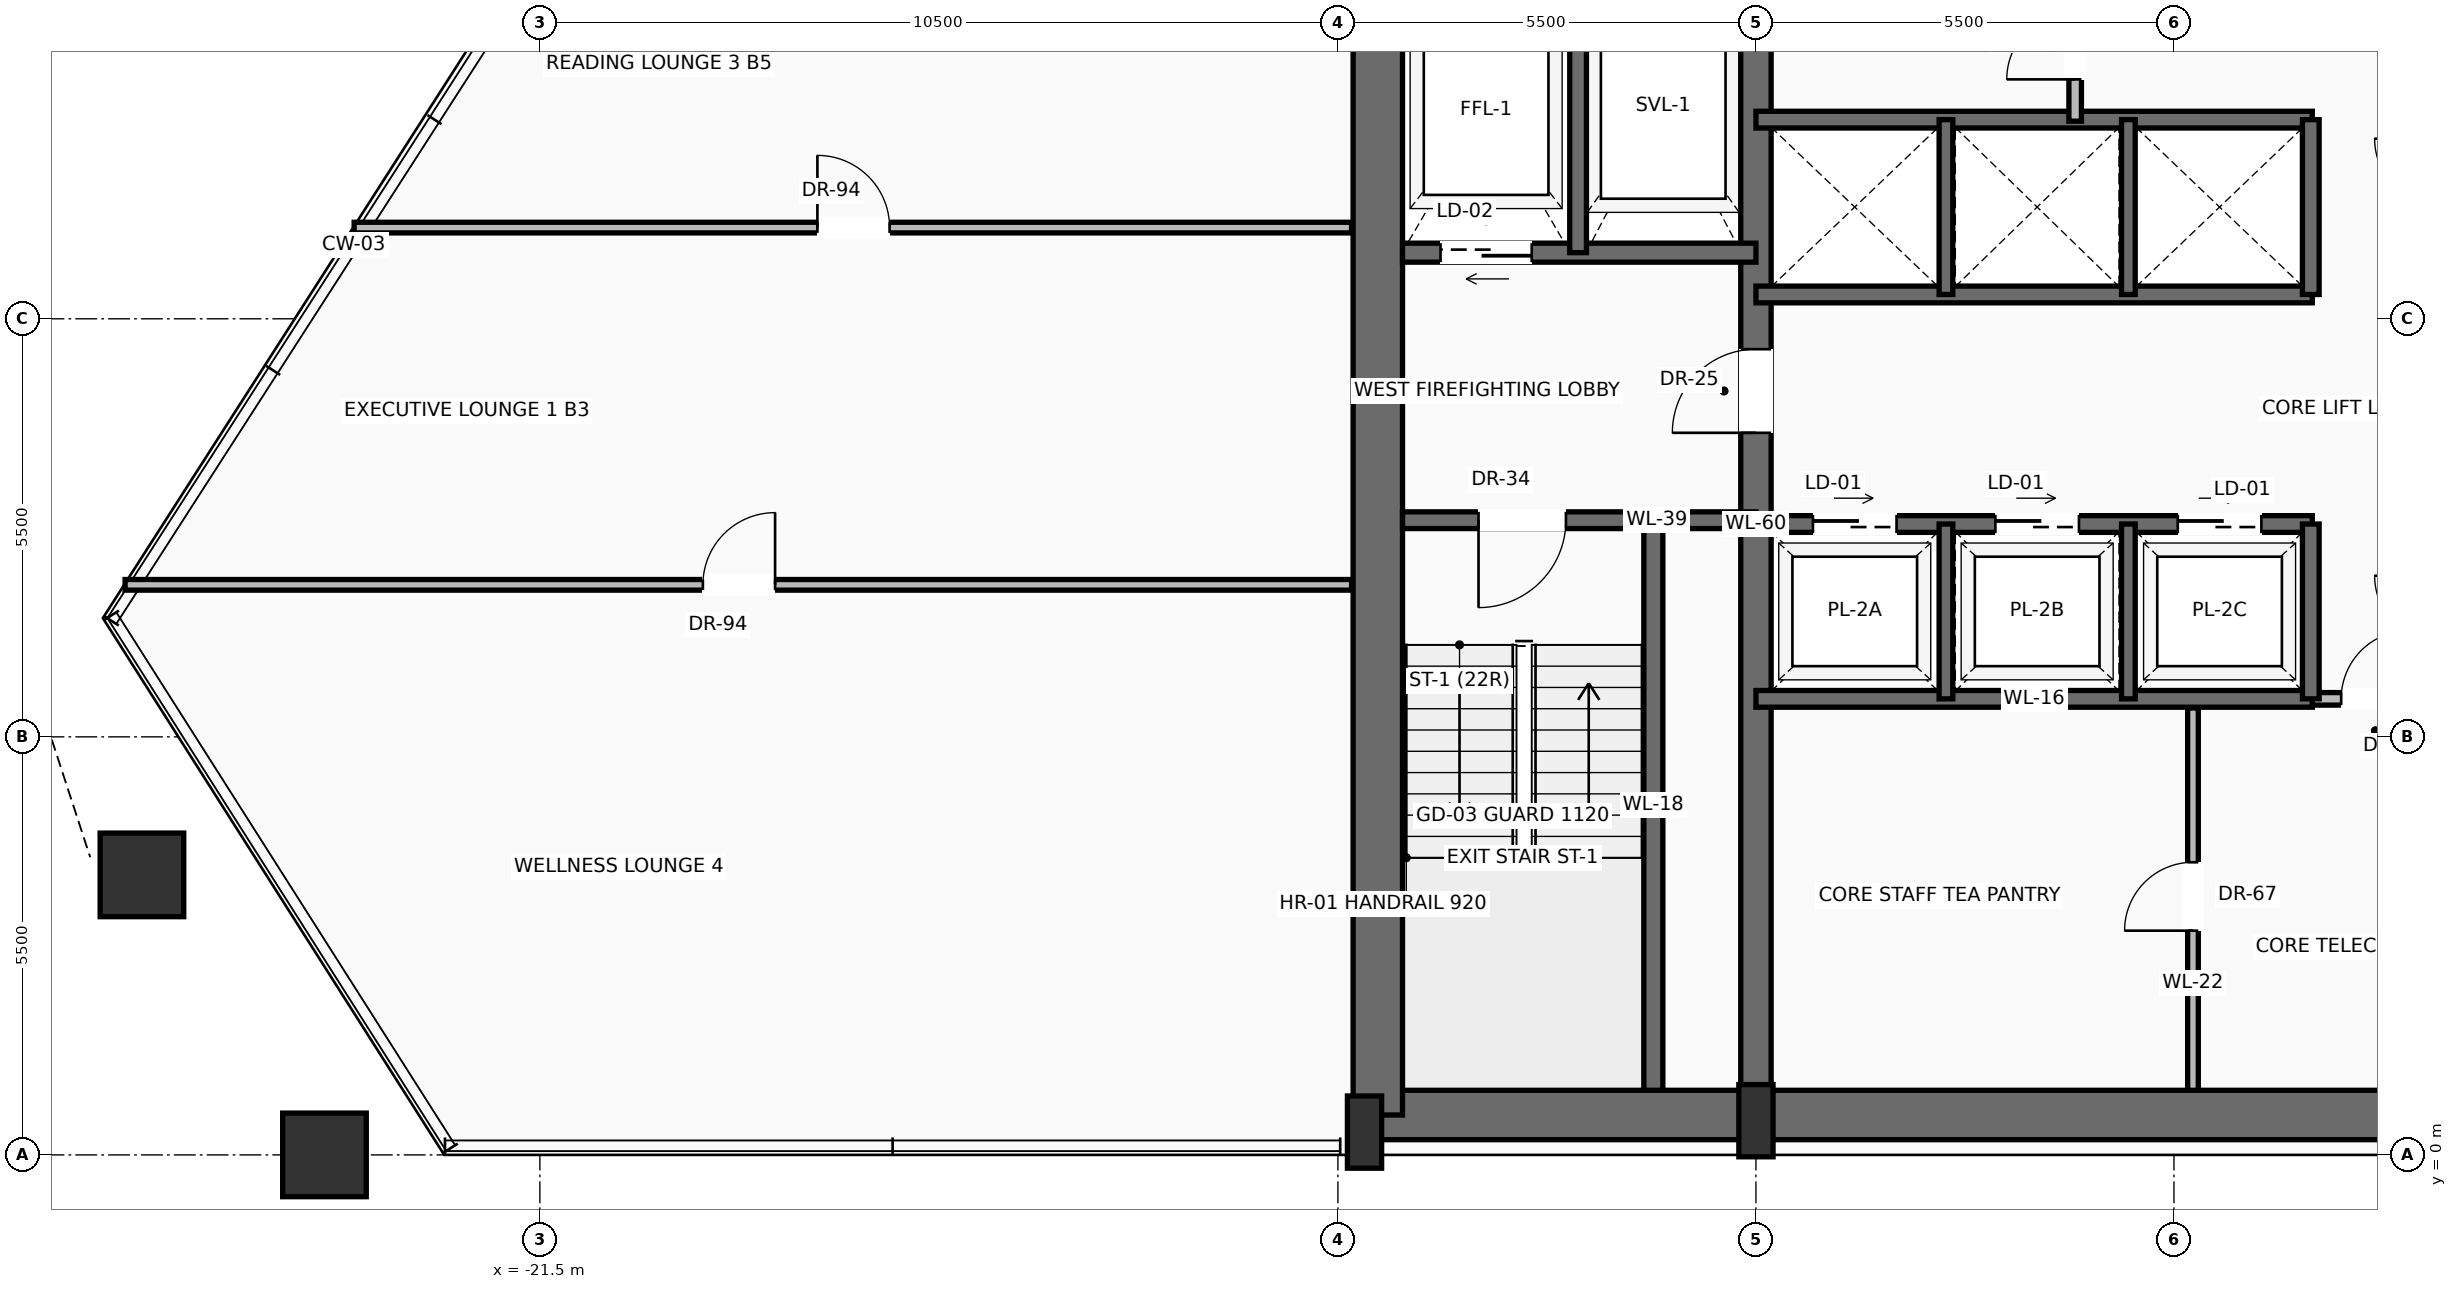
"""IFC4 building model, lengths in metres.
Left out: names, types, materials, properties, quantities, classifications, styles, units other than length and angle.
Written with IfcOpenShell. Run it as: python <this file> out.ifc"""

import sys

from ifc_helpers import new_model, si_unit, direction, frame, frame_2d, origin, origin_2d, place, context, subcontext, project, spatial, rectangle, hollow_rectangle, extrude, source, transform, mapped, element, fill, save


model = new_model("IFC4")
c1 = context("Model", 3, precision=1e-05, world=origin(), true_north=direction((0.0, 1.0)))
c2 = subcontext(c1, "Body", "Model", "MODEL_VIEW")
j1 = project(units=[si_unit("LENGTHUNIT", "METRE"), si_unit("PLANEANGLEUNIT", "RADIAN")], contexts=[c1])
p1 = place(None, origin())
s1 = spatial("IfcSite", under=j1, at=p1, CompositionType="ELEMENT")
p2 = place(p1, origin())
s2 = spatial("IfcBuilding", under=s1, at=p2, CompositionType="ELEMENT")
p3 = place(p2, frame((0.0, 0.0, 155.2)))
s3 = spatial("IfcBuildingStorey", under=s2, at=p3, CompositionType="ELEMENT", Elevation=155.2)
p4 = place(p3, frame((-10.65, 0.525, 0.0), z_axis=(0.0, 0.0, 1.0), x_axis=(1.0, 0.0, 0.0)))
e1 = element("IfcWall", 1, at=p4, inside=s3, PredefinedType="SHEAR", context=c2, shape_type="SweptSolid", body=[
    extrude(rectangle(XDim=21.3, YDim=0.65, at=frame_2d((10.65, 0.0))), origin(), (0.0, 0.0, 1.0), 3.47),
])
p5 = place(p3, frame((-10.475, 0.525, 0.0), z_axis=(0.0, 0.0, 1.0), x_axis=(0.0, 1.0, 0.0)))
e2 = element("IfcWall", 2, at=p5, inside=s3, PredefinedType="SHEAR", context=c2, shape_type="SweptSolid", body=[
    extrude(rectangle(XDim=15.55, YDim=0.65, at=frame_2d((7.775, 0.0))), origin(), (0.0, 0.0, 1.0), 3.47),
])
p6 = place(p3, frame((-5.5, 0.525, 0.0), z_axis=(0.0, 0.0, 1.0), x_axis=(0.0, 1.0, 0.0)))
e3 = element("IfcWall", 3, at=p6, inside=s3, PredefinedType="SHEAR", context=c2, shape_type="SweptSolid", body=[
    extrude(rectangle(XDim=15.55, YDim=0.4, at=frame_2d((7.775, 0.0))), origin(), (0.0, 0.0, 1.0), 3.47),
])
p7 = place(p6, frame((8.975, 0.0, 0.0)))
e4 = element("IfcOpeningElement", 4, at=p7, cuts=e3, PredefinedType="OPENING", context=c2, shape_type="SweptSolid", body=[
    extrude(rectangle(XDim=1.1, YDim=2.2, at=frame_2d((0.55, 1.1))), frame((0.0, 0.21, 0.0), z_axis=(0.0, -1.0, 0.0), x_axis=(1.0, 0.0, 0.0)), (0.0, 0.0, 1.0), 0.42),
])
m1 = source(origin(), c2, "Body", "SweptSolid", [
    extrude(rectangle(XDim=0.45, YDim=0.95, at=origin_2d()), origin(), (0.0, 0.0, 1.0), 3.7),
])
for number, where, z_axis, x_axis in (
    (5, (-10.65, 0.3, 0.0), (0.0, 0.0, 1.0), (1.0, 0.0, 0.0)),
    (6, (-5.5, 0.45, 0.0), (0.0, 0.0, 1.0), (1.0, 0.0, 0.0)),
):
    element("IfcColumn", number, at=place(p3, frame(where, z_axis=z_axis, x_axis=x_axis)), inside=s3, PredefinedType="PILASTER", context=c2, shape_type="MappedRepresentation", body=[
        mapped(m1, transform((0.0, 0.0, 0.0), scale=1.0)),
    ])
m2 = source(origin(), c2, "Body", "SweptSolid", [
    extrude(hollow_rectangle(XDim=1.1, YDim=1.1, WallThickness=0.055, at=origin_2d()), origin(), (0.0, 0.0, 1.0), 3.691),
])
p8 = place(p3, frame((-24.334, 0.0, 0.004), z_axis=(-0.009590140351, 0.0, 0.999954013547), x_axis=(0.0, -1.0, 0.0)))
e7 = element("IfcColumn", 7, at=p8, inside=s3, PredefinedType="COLUMN", context=c2, shape_type="MappedRepresentation", body=[
    mapped(m2, transform((0.0, 0.0, 0.0), scale=1.0)),
])
m3 = source(origin(), c2, "Body", "SweptSolid", [
    extrude(hollow_rectangle(XDim=1.1, YDim=1.1, WallThickness=0.055, at=origin_2d()), origin(), (0.0, 0.0, 1.0), 3.692),
])
p9 = place(p3, frame((-26.736, 3.684, 0.004), z_axis=(0.000925869152, -0.015938176115, 0.999872550533), x_axis=(0.998316959719, 0.057993516332, 0.0)))
e8 = element("IfcColumn", 8, at=p9, inside=s3, PredefinedType="COLUMN", context=c2, shape_type="MappedRepresentation", body=[
    mapped(m3, transform((0.0, 0.0, 0.0), scale=1.0)),
])
p10 = place(p3, frame((-6.85, 0.85, 0.0), z_axis=(0.0, 0.0, 1.0), x_axis=(0.0, 1.0, 0.0)))
e9 = element("IfcWall", 9, at=p10, inside=s3, PredefinedType="SOLIDWALL", context=c2, shape_type="SweptSolid", body=[
    extrude(rectangle(XDim=7.5, YDim=0.25, at=frame_2d((3.75, 0.0))), origin(), (0.0, 0.0, 1.0), 3.47),
])
p11 = place(p3, frame((-5.5, 8.35, 0.0), z_axis=(0.0, 0.0, 1.0), x_axis=(-1.0, 0.0, 0.0)))
e10 = element("IfcWall", 10, at=p11, inside=s3, PredefinedType="SOLIDWALL", context=c2, shape_type="SweptSolid", body=[
    extrude(rectangle(XDim=4.65, YDim=0.22, at=frame_2d((2.325, 0.0))), origin(), (0.0, 0.0, 1.0), 3.47),
])
p12 = place(p11, frame((2.5, 0.0, 0.0)))
e11 = element("IfcOpeningElement", 11, at=p12, cuts=e10, PredefinedType="OPENING", context=c2, shape_type="SweptSolid", body=[
    extrude(rectangle(XDim=1.15, YDim=2.2, at=frame_2d((0.575, 1.1))), frame((0.0, 0.12, 0.0), z_axis=(0.0, -1.0, 0.0), x_axis=(1.0, 0.0, 0.0)), (0.0, 0.0, 1.0), 0.24),
])
p13 = place(p3, frame((-5.5, 11.87, 0.0), z_axis=(0.0, 0.0, 1.0), x_axis=(-1.0, 0.0, 0.0)))
e12 = element("IfcWall", 12, at=p13, inside=s3, PredefinedType="SOLIDWALL", context=c2, shape_type="SweptSolid", body=[
    extrude(rectangle(XDim=4.65, YDim=0.25, at=frame_2d((2.325, 0.0))), origin(), (0.0, 0.0, 1.0), 3.47),
])
p14 = place(p13, frame((2.95, 0.0, 0.0)))
e13 = element("IfcOpeningElement", 13, at=p14, cuts=e12, PredefinedType="OPENING", context=c2, shape_type="SweptSolid", body=[
    extrude(rectangle(XDim=1.2, YDim=2.25, at=frame_2d((0.6, 1.125))), frame((0.0, 0.135, 0.0), z_axis=(0.0, -1.0, 0.0), x_axis=(1.0, 0.0, 0.0)), (0.0, 0.0, 1.0), 0.27),
])
p15 = place(p3, frame((-7.84, 11.87, 0.0), z_axis=(0.0, 0.0, 1.0), x_axis=(0.0, 1.0, 0.0)))
e14 = element("IfcWall", 14, at=p15, inside=s3, PredefinedType="SOLIDWALL", context=c2, shape_type="SweptSolid", body=[
    extrude(rectangle(XDim=3.88, YDim=0.22, at=frame_2d((1.94, 0.0))), origin(), (0.0, 0.0, 1.0), 3.47),
])
p16 = place(p3, frame((1.82, 6.0, 0.0), z_axis=(0.0, 0.0, 1.0), x_axis=(1.0, 0.0, 0.0)))
e15 = element("IfcWall", 15, at=p16, inside=s3, PredefinedType="PARTITIONING", context=c2, shape_type="SweptSolid", body=[
    extrude(rectangle(XDim=3.48, YDim=0.165, at=frame_2d((1.74, 0.0))), origin(), (0.0, 0.0, 1.0), 3.462),
])
p17 = place(p16, frame((0.38, 0.0, 0.0)))
e16 = element("IfcOpeningElement", 16, at=p17, cuts=e15, PredefinedType="OPENING", context=c2, shape_type="SweptSolid", body=[
    extrude(rectangle(XDim=0.9, YDim=2.1, at=frame_2d((0.45, 1.05))), frame((0.0, 0.093, 0.0), z_axis=(0.0, -1.0, 0.0), x_axis=(1.0, 0.0, 0.0)), (0.0, 0.0, 1.0), 0.185),
])
p18 = place(p3, frame((0.25, 0.85, 0.0), z_axis=(0.0, 0.0, 1.0), x_axis=(0.0, 1.0, 0.0)))
e17 = element("IfcWall", 17, at=p18, inside=s3, PredefinedType="PARTITIONING", context=c2, shape_type="SweptSolid", body=[
    extrude(rectangle(XDim=5.03, YDim=0.14, at=frame_2d((2.515, 0.0))), origin(), (0.0, 0.0, 1.0), 3.462),
])
p19 = place(p18, frame((2.1, 0.0, 0.0)))
e18 = element("IfcOpeningElement", 18, at=p19, cuts=e17, PredefinedType="OPENING", context=c2, shape_type="SweptSolid", body=[
    extrude(rectangle(XDim=0.9, YDim=2.1, at=frame_2d((0.45, 1.05))), frame((0.0, 0.08, 0.0), z_axis=(0.0, -1.0, 0.0), x_axis=(1.0, 0.0, 0.0)), (0.0, 0.0, 1.0), 0.16),
])
p20 = place(p3, frame((-5.5, 6.0, 0.0), z_axis=(0.0, 0.0, 1.0), x_axis=(1.0, 0.0, 0.0)))
e19 = element("IfcWall", 19, at=p20, inside=s3, PredefinedType="SOLIDWALL", context=c2, shape_type="SweptSolid", body=[
    extrude(rectangle(XDim=7.32, YDim=0.22, at=frame_2d((3.66, 0.0))), origin(), (0.0, 0.0, 1.0), 3.47),
])
p21 = place(p3, frame((-5.5, 8.3, 0.0), z_axis=(0.0, 0.0, 1.0), x_axis=(1.0, 0.0, 0.0)))
e20 = element("IfcWall", 20, at=p21, inside=s3, PredefinedType="SOLIDWALL", context=c2, shape_type="SweptSolid", body=[
    extrude(rectangle(XDim=7.32, YDim=0.22, at=frame_2d((3.66, 0.0))), origin(), (0.0, 0.0, 1.0), 3.47),
])
p22 = place(p21, frame((0.75, 0.0, 0.0)))
e21 = element("IfcOpeningElement", 21, at=p22, cuts=e20, PredefinedType="OPENING", context=c2, shape_type="SweptSolid", body=[
    extrude(rectangle(XDim=1.1, YDim=2.2, at=frame_2d((0.55, 1.1))), frame((0.0, 0.12, 0.0), z_axis=(0.0, -1.0, 0.0), x_axis=(1.0, 0.0, 0.0)), (0.0, 0.0, 1.0), 0.24),
])
p23 = place(p21, frame((3.15, 0.0, 0.0)))
e22 = element("IfcOpeningElement", 22, at=p23, cuts=e20, PredefinedType="OPENING", context=c2, shape_type="SweptSolid", body=[
    extrude(rectangle(XDim=1.1, YDim=2.2, at=frame_2d((0.55, 1.1))), frame((0.0, 0.12, 0.0), z_axis=(0.0, -1.0, 0.0), x_axis=(1.0, 0.0, 0.0)), (0.0, 0.0, 1.0), 0.24),
])
p24 = place(p21, frame((5.55, 0.0, 0.0)))
e23 = element("IfcOpeningElement", 23, at=p24, cuts=e20, PredefinedType="OPENING", context=c2, shape_type="SweptSolid", body=[
    extrude(rectangle(XDim=1.1, YDim=2.2, at=frame_2d((0.55, 1.1))), frame((0.0, 0.12, 0.0), z_axis=(0.0, -1.0, 0.0), x_axis=(1.0, 0.0, 0.0)), (0.0, 0.0, 1.0), 0.24),
])
p25 = place(p3, frame((1.8, 6.0, 0.0), z_axis=(0.0, 0.0, 1.0), x_axis=(0.0, 1.0, 0.0)))
e24 = element("IfcWall", 24, at=p25, inside=s3, PredefinedType="SOLIDWALL", context=c2, shape_type="SweptSolid", body=[
    extrude(rectangle(XDim=2.3, YDim=0.22, at=frame_2d((1.15, 0.0))), origin(), (0.0, 0.0, 1.0), 3.47),
])
for number, where, z_axis, x_axis in (
    (25, (-3.0, 6.0, 0.0), (0.0, 0.0, 1.0), (0.0, 1.0, 0.0)),
    (26, (-0.6, 6.0, 0.0), (0.0, 0.0, 1.0), (0.0, 1.0, 0.0)),
):
    element("IfcWall", number, at=place(p3, frame(where, z_axis=z_axis, x_axis=x_axis)), inside=s3, PredefinedType="SOLIDWALL", context=c2, shape_type="SweptSolid", body=[
        extrude(rectangle(XDim=2.3, YDim=0.18, at=frame_2d((1.15, 0.0))), origin(), (0.0, 0.0, 1.0), 3.47),
    ])
for number, where, z_axis, x_axis in (
    (27, (-5.5, 11.32, 0.0), (0.0, 0.0, 1.0), (1.0, 0.0, 0.0)),
    (28, (-5.5, 13.62, 0.0), (0.0, 0.0, 1.0), (1.0, 0.0, 0.0)),
):
    element("IfcWall", number, at=place(p3, frame(where, z_axis=z_axis, x_axis=x_axis)), inside=s3, PredefinedType="SOLIDWALL", context=c2, shape_type="SweptSolid", body=[
        extrude(rectangle(XDim=7.32, YDim=0.22, at=frame_2d((3.66, 0.0))), origin(), (0.0, 0.0, 1.0), 3.47),
    ])
p26 = place(p3, frame((1.8, 11.32, 0.0), z_axis=(0.0, 0.0, 1.0), x_axis=(0.0, 1.0, 0.0)))
e29 = element("IfcWall", 29, at=p26, inside=s3, PredefinedType="SOLIDWALL", context=c2, shape_type="SweptSolid", body=[
    extrude(rectangle(XDim=2.3, YDim=0.22, at=frame_2d((1.15, 0.0))), origin(), (0.0, 0.0, 1.0), 3.47),
])
for number, where, z_axis, x_axis in (
    (30, (-3.0, 11.32, 0.0), (0.0, 0.0, 1.0), (0.0, 1.0, 0.0)),
    (31, (-0.6, 11.32, 0.0), (0.0, 0.0, 1.0), (0.0, 1.0, 0.0)),
):
    element("IfcWall", number, at=place(p3, frame(where, z_axis=z_axis, x_axis=x_axis)), inside=s3, PredefinedType="SOLIDWALL", context=c2, shape_type="SweptSolid", body=[
        extrude(rectangle(XDim=2.3, YDim=0.18, at=frame_2d((1.15, 0.0))), origin(), (0.0, 0.0, 1.0), 3.47),
    ])
p27 = place(p3, frame((-1.3, 13.6, 0.0), z_axis=(0.0, 0.0, 1.0), x_axis=(0.0, 1.0, 0.0)))
e32 = element("IfcWall", 32, at=p27, inside=s3, PredefinedType="PARTITIONING", context=c2, shape_type="SweptSolid", body=[
    extrude(rectangle(XDim=2.15, YDim=0.165, at=frame_2d((1.075, 0.0))), origin(), (0.0, 0.0, 1.0), 3.462),
])
p28 = place(p27, frame((0.55, 0.0, 0.0)))
e33 = element("IfcOpeningElement", 33, at=p28, cuts=e32, PredefinedType="OPENING", context=c2, shape_type="SweptSolid", body=[
    extrude(rectangle(XDim=0.9, YDim=2.1, at=frame_2d((0.45, 1.05))), frame((0.0, 0.093, 0.0), z_axis=(0.0, -1.0, 0.0), x_axis=(1.0, 0.0, 0.0)), (0.0, 0.0, 1.0), 0.185),
])
p29 = place(p3, frame((-26.957, 7.5, 0.0), z_axis=(0.0, 0.0, 1.0), x_axis=(1.0, 0.0, 0.0)))
e34 = element("IfcWall", 34, at=p29, inside=s3, PredefinedType="PARTITIONING", context=c2, shape_type="SweptSolid", body=[
    extrude(rectangle(XDim=16.137, YDim=0.14, at=frame_2d((8.069, 0.0))), origin(), (0.0, 0.0, 1.0), 3.462),
])
p30 = place(p29, frame((7.602, 0.0, 0.0)))
e35 = element("IfcOpeningElement", 35, at=p30, cuts=e34, PredefinedType="OPENING", context=c2, shape_type="SweptSolid", body=[
    extrude(rectangle(XDim=0.95, YDim=2.2, at=frame_2d((0.475, 1.1))), frame((0.0, 0.08, 0.0), z_axis=(0.0, -1.0, 0.0), x_axis=(1.0, 0.0, 0.0)), (0.0, 0.0, 1.0), 0.16),
])
p31 = place(p3, frame((-23.944, 12.2, 0.0), z_axis=(0.0, 0.0, 1.0), x_axis=(1.0, 0.0, 0.0)))
e36 = element("IfcWall", 36, at=p31, inside=s3, PredefinedType="PARTITIONING", context=c2, shape_type="SweptSolid", body=[
    extrude(rectangle(XDim=13.124, YDim=0.14, at=frame_2d((6.562, 0.0))), origin(), (0.0, 0.0, 1.0), 3.462),
])
p32 = place(p31, frame((6.095, 0.0, 0.0)))
e37 = element("IfcOpeningElement", 37, at=p32, cuts=e36, PredefinedType="OPENING", context=c2, shape_type="SweptSolid", body=[
    extrude(rectangle(XDim=0.95, YDim=2.2, at=frame_2d((0.475, 1.1))), frame((0.0, 0.08, 0.0), z_axis=(0.0, -1.0, 0.0), x_axis=(1.0, 0.0, 0.0)), (0.0, 0.0, 1.0), 0.16),
])
m4 = source(origin(), c2, "Body", "SweptSolid", [
    extrude(rectangle(XDim=1.15, YDim=2.2, at=frame_2d((0.575, 1.1))), frame((0.0, 0.025, 0.0), z_axis=(0.0, -1.0, 0.0), x_axis=(1.0, 0.0, 0.0)), (0.0, 0.0, 1.0), 0.05),
])
p33 = place(p12, origin())
e38 = element("IfcDoor", 38, at=p33, inside=s3, OperationType="SINGLE_SWING_RIGHT", PredefinedType="DOOR", context=c2, shape_type="MappedRepresentation", body=[
    mapped(m4, transform((0.0, 0.0, 0.0), scale=1.0)),
])
fill(e11, e38)
m5 = source(origin(), c2, "Body", "SweptSolid", [
    extrude(rectangle(XDim=1.1, YDim=2.2, at=frame_2d((0.55, 1.1))), frame((0.0, 0.025, 0.0), z_axis=(0.0, -1.0, 0.0), x_axis=(1.0, 0.0, 0.0)), (0.0, 0.0, 1.0), 0.05),
])
p34 = place(p7, origin())
e39 = element("IfcDoor", 39, at=p34, inside=s3, OperationType="SINGLE_SWING_LEFT", PredefinedType="DOOR", context=c2, shape_type="MappedRepresentation", body=[
    mapped(m5, transform((0.0, 0.0, 0.0), scale=1.0)),
])
fill(e4, e39)
m6 = source(origin(), c2, "Body", "SweptSolid", [
    extrude(rectangle(XDim=1.2, YDim=2.25, at=frame_2d((0.6, 1.125))), frame((0.0, 0.025, 0.0), z_axis=(0.0, -1.0, 0.0), x_axis=(1.0, 0.0, 0.0)), (0.0, 0.0, 1.0), 0.05),
])
p35 = place(p14, origin())
e40 = element("IfcDoor", 40, at=p35, inside=s3, OperationType="SLIDING_TO_LEFT", PredefinedType="DOOR", context=c2, shape_type="MappedRepresentation", body=[
    mapped(m6, transform((0.0, 0.0, 0.0), scale=1.0)),
])
fill(e13, e40)
m7 = source(origin(), c2, "Body", "SweptSolid", [
    extrude(rectangle(XDim=0.9, YDim=2.1, at=frame_2d((0.45, 1.05))), frame((0.0, 0.025, 0.0), z_axis=(0.0, -1.0, 0.0), x_axis=(1.0, 0.0, 0.0)), (0.0, 0.0, 1.0), 0.05),
])
p36 = place(p17, origin())
e41 = element("IfcDoor", 41, at=p36, inside=s3, OperationType="SINGLE_SWING_RIGHT", PredefinedType="DOOR", context=c2, shape_type="MappedRepresentation", body=[
    mapped(m7, transform((0.0, 0.0, 0.0), scale=1.0)),
])
fill(e16, e41)
p37 = place(p19, origin())
e42 = element("IfcDoor", 42, at=p37, inside=s3, OperationType="SINGLE_SWING_LEFT", PredefinedType="DOOR", context=c2, shape_type="MappedRepresentation", body=[
    mapped(m7, transform((0.0, 0.0, 0.0), scale=1.0)),
])
fill(e18, e42)
m8 = source(origin(), c2, "Body", "SweptSolid", [
    extrude(rectangle(XDim=1.1, YDim=2.2, at=frame_2d((0.55, 1.1))), frame((0.0, 0.025, 0.0), z_axis=(0.0, -1.0, 0.0), x_axis=(1.0, 0.0, 0.0)), (0.0, 0.0, 1.0), 0.05),
])
p38 = place(p22, origin())
e43 = element("IfcDoor", 43, at=p38, inside=s3, OperationType="SLIDING_TO_LEFT", PredefinedType="DOOR", context=c2, shape_type="MappedRepresentation", body=[
    mapped(m8, transform((0.0, 0.0, 0.0), scale=1.0)),
])
fill(e21, e43)
p39 = place(p23, origin())
e44 = element("IfcDoor", 44, at=p39, inside=s3, OperationType="SLIDING_TO_LEFT", PredefinedType="DOOR", context=c2, shape_type="MappedRepresentation", body=[
    mapped(m8, transform((0.0, 0.0, 0.0), scale=1.0)),
])
fill(e22, e44)
p40 = place(p24, origin())
e45 = element("IfcDoor", 45, at=p40, inside=s3, OperationType="SLIDING_TO_LEFT", PredefinedType="DOOR", context=c2, shape_type="MappedRepresentation", body=[
    mapped(m8, transform((0.0, 0.0, 0.0), scale=1.0)),
])
fill(e23, e45)
p41 = place(p28, origin())
e46 = element("IfcDoor", 46, at=p41, inside=s3, OperationType="SINGLE_SWING_LEFT", PredefinedType="DOOR", context=c2, shape_type="MappedRepresentation", body=[
    mapped(m7, transform((0.0, 0.0, 0.0), scale=1.0)),
])
fill(e33, e46)
m9 = source(origin(), c2, "Body", "SweptSolid", [
    extrude(rectangle(XDim=0.95, YDim=2.2, at=frame_2d((0.475, 1.1))), frame((0.0, 0.025, 0.0), z_axis=(0.0, -1.0, 0.0), x_axis=(1.0, 0.0, 0.0)), (0.0, 0.0, 1.0), 0.05),
])
p42 = place(p32, origin())
e47 = element("IfcDoor", 47, at=p42, inside=s3, OperationType="SINGLE_SWING_LEFT", PredefinedType="DOOR", context=c2, shape_type="MappedRepresentation", body=[
    mapped(m9, transform((0.0, 0.0, 0.0), scale=1.0)),
])
fill(e37, e47)
p43 = place(p30, origin())
e48 = element("IfcDoor", 48, at=p43, inside=s3, OperationType="SINGLE_SWING_RIGHT", PredefinedType="DOOR", context=c2, shape_type="MappedRepresentation", body=[
    mapped(m9, transform((0.0, 0.0, 0.0), scale=1.0)),
])
fill(e35, e48)
save(model, sys.argv[1])
